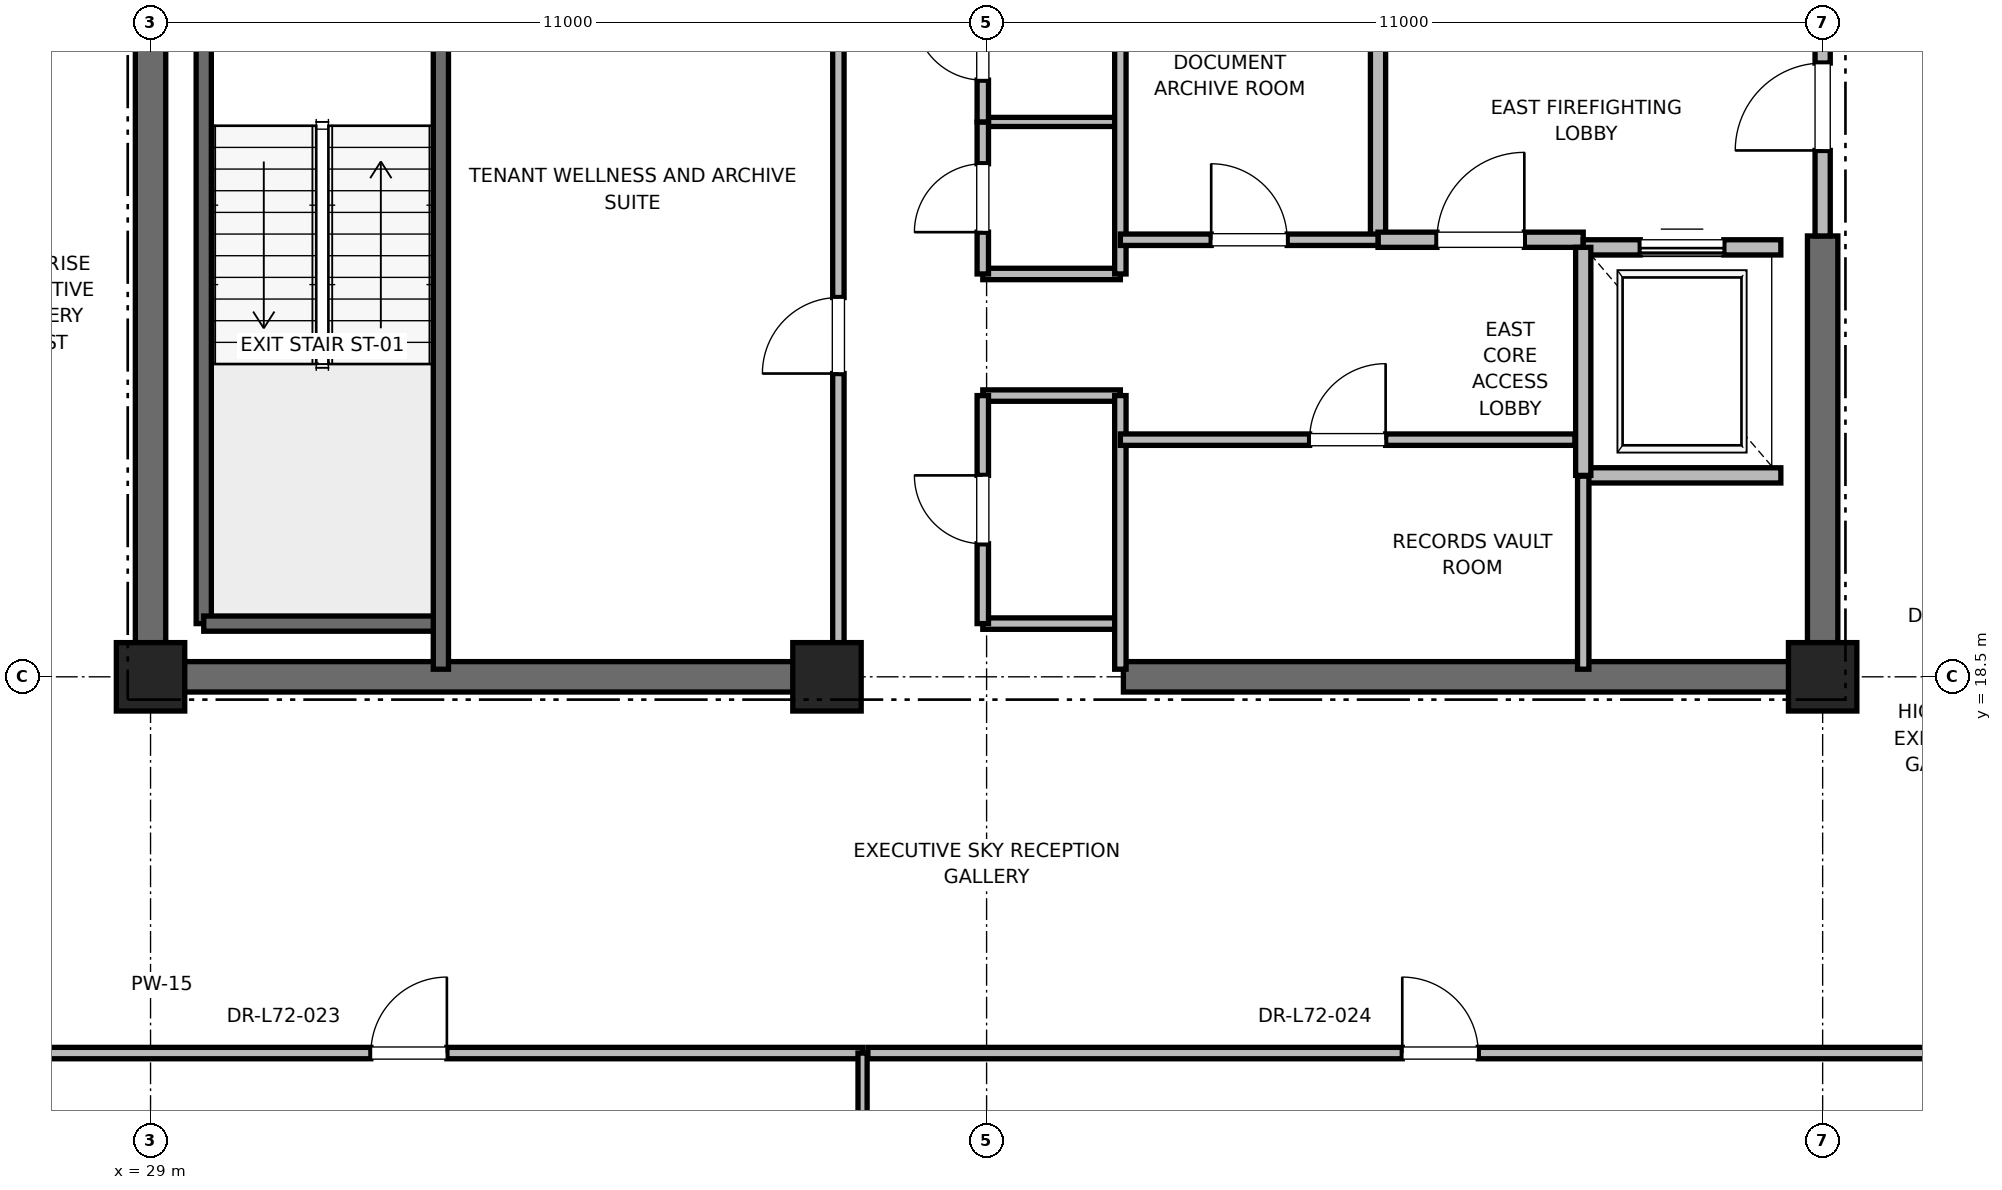
"""IFC4 building model, lengths in metres.
Left out: names, types, materials, properties, quantities, classifications, styles, units other than length and angle.
Written with IfcOpenShell. Run it as: python <this file> out.ifc"""

import sys

from ifc_helpers import new_model, si_unit, direction, frame, frame_2d, origin, origin_2d, place, context, subcontext, project, spatial, rectangle, extrude, element, fill, save


model = new_model("IFC4")
c1 = context("Model", 3, precision=1e-05, world=origin(), true_north=direction((0.0, 1.0)))
c2 = subcontext(c1, "Body", "Model", "MODEL_VIEW")
j1 = project(units=[si_unit("LENGTHUNIT", "METRE"), si_unit("PLANEANGLEUNIT", "RADIAN")], contexts=[c1])
p1 = place(None, origin())
s1 = spatial("IfcSite", under=j1, at=p1, CompositionType="ELEMENT")
p2 = place(p1, origin())
s2 = spatial("IfcBuilding", under=s1, at=p2, CompositionType="ELEMENT")
p3 = place(p2, frame((0.0, 0.0, 310.8)))
s3 = spatial("IfcBuildingStorey", under=s2, at=p3, CompositionType="ELEMENT", Elevation=310.8)
for number, where, z_axis, x_axis in (
    (1, (29.0, 18.5, 0.0), (0.0, 0.0, 1.0), (1.0, 0.0, 0.0)),
    (2, (51.0, 18.5, 0.0), (0.0, 0.0, 1.0), (1.0, 0.0, 0.0)),
    (3, (37.9, 18.5, 0.0), (0.0, 0.0, 1.0), (1.0, 0.0, 0.0)),
):
    element("IfcColumn", number, at=place(p3, frame(where, z_axis=z_axis, x_axis=x_axis)), inside=s3, PredefinedType="PILASTER", context=c2, shape_type="SweptSolid", body=[
        extrude(rectangle(XDim=0.9, YDim=0.9, at=origin_2d()), origin(), (0.0, 0.0, 1.0), 4.0),
    ])
for number, where, z_axis, x_axis in (
    (4, (29.0, 18.5, 0.0), (0.0, 0.0, 1.0), (1.0, 0.0, 0.0)),
    (5, (41.8, 18.5, 0.0), (0.0, 0.0, 1.0), (1.0, 0.0, 0.0)),
):
    element("IfcWall", number, at=place(p3, frame(where, z_axis=z_axis, x_axis=x_axis)), inside=s3, PredefinedType="SHEAR", context=c2, shape_type="SweptSolid", body=[
        extrude(rectangle(XDim=9.2, YDim=0.4, at=frame_2d((4.6, 0.0))), origin(), (0.0, 0.0, 1.0), 3.785),
    ])
p4 = place(p3, frame((29.0, 18.5, 0.0), z_axis=(0.0, 0.0, 1.0), x_axis=(0.0, 1.0, 0.0)))
e6 = element("IfcWall", 6, at=p4, inside=s3, PredefinedType="SHEAR", context=c2, shape_type="SweptSolid", body=[
    extrude(rectangle(XDim=8.8, YDim=0.4, at=frame_2d((4.4, 0.0))), origin(), (0.0, 0.0, 1.0), 3.785),
])
p5 = place(p3, frame((51.0, 18.5, 0.0), z_axis=(0.0, 0.0, 1.0), x_axis=(0.0, 1.0, 0.0)))
e7 = element("IfcWall", 7, at=p5, inside=s3, PredefinedType="SHEAR", context=c2, shape_type="SweptSolid", body=[
    extrude(rectangle(XDim=5.8, YDim=0.4, at=frame_2d((2.9, 0.0))), origin(), (0.0, 0.0, 1.0), 3.785),
])
p6 = place(p3, frame((29.7, 19.2, 0.0), z_axis=(0.0, 0.0, 1.0), x_axis=(0.0, 1.0, 0.0)))
e8 = element("IfcWall", 8, at=p6, inside=s3, PredefinedType="SOLIDWALL", context=c2, shape_type="SweptSolid", body=[
    extrude(rectangle(XDim=8.15, YDim=0.2, at=frame_2d((4.075, 0.0))), origin(), (0.0, 0.0, 1.0), 3.785),
])
p7 = place(p3, frame((29.7, 19.2, 0.0), z_axis=(0.0, 0.0, 1.0), x_axis=(1.0, 0.0, 0.0)))
e9 = element("IfcWall", 9, at=p7, inside=s3, PredefinedType="SOLIDWALL", context=c2, shape_type="SweptSolid", body=[
    extrude(rectangle(XDim=3.12, YDim=0.2, at=frame_2d((1.56, 0.0))), origin(), (0.0, 0.0, 1.0), 3.785),
])
p8 = place(p3, frame((32.82, 18.6, 0.0), z_axis=(0.0, 0.0, 1.0), x_axis=(0.0, 1.0, 0.0)))
e10 = element("IfcWall", 10, at=p8, inside=s3, PredefinedType="SOLIDWALL", context=c2, shape_type="SweptSolid", body=[
    extrude(rectangle(XDim=8.78, YDim=0.2, at=frame_2d((4.39, 0.0))), origin(), (0.0, 0.0, 1.0), 3.785),
])
p9 = place(p3, frame((45.15, 24.25, 0.0), z_axis=(0.0, 0.0, 1.0), x_axis=(0.0, 1.0, 0.0)))
e11 = element("IfcWall", 11, at=p9, inside=s3, PredefinedType="PARTITIONING", context=c2, shape_type="SweptSolid", body=[
    extrude(rectangle(XDim=3.37, YDim=0.2, at=frame_2d((1.685, 0.0))), origin(), (0.0, 0.0, 1.0), 3.785),
])
p10 = place(p3, frame((45.15, 24.25, 0.0), z_axis=(0.0, 0.0, 1.0), x_axis=(1.0, 0.0, 0.0)))
e12 = element("IfcWall", 12, at=p10, inside=s3, PredefinedType="PARTITIONING", context=c2, shape_type="SweptSolid", body=[
    extrude(rectangle(XDim=2.7, YDim=0.2, at=frame_2d((1.35, 0.0))), origin(), (0.0, 0.0, 1.0), 3.785),
])
p11 = place(p10, frame((0.775, 0.0, 0.0)))
e13 = element("IfcOpeningElement", 13, at=p11, cuts=e12, PredefinedType="OPENING", context=c2, shape_type="SweptSolid", body=[
    extrude(rectangle(XDim=1.15, YDim=2.2, at=frame_2d((0.575, 1.1))), frame((0.0, 0.1, 0.0), z_axis=(0.0, -1.0, 0.0), x_axis=(1.0, 0.0, 0.0)), (0.0, 0.0, 1.0), 0.2),
])
p12 = place(p3, frame((51.0, 24.3, 0.0), z_axis=(0.0, 0.0, 1.0), x_axis=(0.0, 1.0, 0.0)))
e14 = element("IfcWall", 14, at=p12, inside=s3, PredefinedType="PARTITIONING", context=c2, shape_type="SweptSolid", body=[
    extrude(rectangle(XDim=3.4, YDim=0.2, at=frame_2d((1.7, 0.0))), origin(), (0.0, 0.0, 1.0), 2.865),
])
p13 = place(p12, frame((1.125, 0.0, 0.0)))
e15 = element("IfcOpeningElement", 15, at=p13, cuts=e14, PredefinedType="OPENING", context=c2, shape_type="SweptSolid", body=[
    extrude(rectangle(XDim=1.15, YDim=2.2, at=frame_2d((0.575, 1.1))), frame((0.0, 0.1, 0.0), z_axis=(0.0, -1.0, 0.0), x_axis=(1.0, 0.0, 0.0)), (0.0, 0.0, 1.0), 0.2),
])
p14 = place(p3, frame((47.85, 21.15, 0.0), z_axis=(0.0, 0.0, 1.0), x_axis=(1.0, 0.0, 0.0)))
e16 = element("IfcWall", 16, at=p14, inside=s3, PredefinedType="SOLIDWALL", context=c2, shape_type="SweptSolid", body=[
    extrude(rectangle(XDim=2.6, YDim=0.2, at=frame_2d((1.3, 0.0))), origin(), (0.0, 0.0, 1.0), 3.785),
])
p15 = place(p3, frame((50.45, 24.15, 0.0), z_axis=(0.0, 0.0, 1.0), x_axis=(-1.0, 0.0, 0.0)))
e17 = element("IfcWall", 17, at=p15, inside=s3, PredefinedType="SOLIDWALL", context=c2, shape_type="SweptSolid", body=[
    extrude(rectangle(XDim=2.6, YDim=0.2, at=frame_2d((1.3, 0.0))), origin(), (0.0, 0.0, 1.0), 2.865),
])
p16 = place(p15, frame((0.75, 0.0, 0.0)))
e18 = element("IfcOpeningElement", 18, at=p16, cuts=e17, PredefinedType="OPENING", context=c2, shape_type="SweptSolid", body=[
    extrude(rectangle(XDim=1.1, YDim=2.2, at=frame_2d((0.55, 1.1))), frame((0.0, 0.1, 0.0), z_axis=(0.0, -1.0, 0.0), x_axis=(1.0, 0.0, 0.0)), (0.0, 0.0, 1.0), 0.2),
])
p17 = place(p3, frame((47.85, 24.15, 0.0), z_axis=(0.0, 0.0, 1.0), x_axis=(0.0, -1.0, 0.0)))
e19 = element("IfcWall", 19, at=p17, inside=s3, PredefinedType="SOLIDWALL", context=c2, shape_type="SweptSolid", body=[
    extrude(rectangle(XDim=3.0, YDim=0.2, at=frame_2d((1.5, 0.0))), origin(), (0.0, 0.0, 1.0), 3.785),
])
for number, where, z_axis, x_axis in (
    (20, (39.95, 19.2, 0.0), (0.0, 0.0, 1.0), (1.0, 0.0, 0.0)),
    (21, (39.95, 22.2, 0.0), (0.0, 0.0, 1.0), (1.0, 0.0, 0.0)),
    (22, (39.95, 23.8, 0.0), (0.0, 0.0, 1.0), (1.0, 0.0, 0.0)),
):
    element("IfcWall", number, at=place(p3, frame(where, z_axis=z_axis, x_axis=x_axis)), inside=s3, PredefinedType="PARTITIONING", context=c2, shape_type="SweptSolid", body=[
        extrude(rectangle(XDim=1.81, YDim=0.15, at=frame_2d((0.905, 0.0))), origin(), (0.0, 0.0, 1.0), 2.85),
    ])
p18 = place(p3, frame((39.95, 25.8, 0.0), z_axis=(0.0, 0.0, 1.0), x_axis=(1.0, 0.0, 0.0)))
e23 = element("IfcWall", 23, at=p18, inside=s3, PredefinedType="PARTITIONING", context=c2, shape_type="SweptSolid", body=[
    extrude(rectangle(XDim=1.81, YDim=0.12, at=frame_2d((0.905, 0.0))), origin(), (0.0, 0.0, 1.0), 2.85),
])
p19 = place(p3, frame((41.76, 18.6, 0.0), z_axis=(0.0, 0.0, 1.0), x_axis=(0.0, 1.0, 0.0)))
e24 = element("IfcWall", 24, at=p19, inside=s3, PredefinedType="PARTITIONING", context=c2, shape_type="SweptSolid", body=[
    extrude(rectangle(XDim=3.6, YDim=0.15, at=frame_2d((1.8, 0.0))), origin(), (0.0, 0.0, 1.0), 2.85),
])
p20 = place(p3, frame((41.76, 23.8, 0.0), z_axis=(0.0, 0.0, 1.0), x_axis=(0.0, 1.0, 0.0)))
e25 = element("IfcWall", 25, at=p20, inside=s3, PredefinedType="PARTITIONING", context=c2, shape_type="SweptSolid", body=[
    extrude(rectangle(XDim=4.0, YDim=0.15, at=frame_2d((2.0, 0.0))), origin(), (0.0, 0.0, 1.0), 2.85),
])
p21 = place(p3, frame((39.95, 19.2, 0.0), z_axis=(0.0, 0.0, 1.0), x_axis=(0.0, 1.0, 0.0)))
e26 = element("IfcWall", 26, at=p21, inside=s3, PredefinedType="PARTITIONING", context=c2, shape_type="SweptSolid", body=[
    extrude(rectangle(XDim=3.0, YDim=0.15, at=frame_2d((1.5, 0.0))), origin(), (0.0, 0.0, 1.0), 2.85),
])
p22 = place(p21, frame((1.05, 0.0, 0.0)))
e27 = element("IfcOpeningElement", 27, at=p22, cuts=e26, PredefinedType="OPENING", context=c2, shape_type="SweptSolid", body=[
    extrude(rectangle(XDim=0.9, YDim=2.1, at=frame_2d((0.45, 1.05))), frame((0.0, 0.075, 0.0), z_axis=(0.0, -1.0, 0.0), x_axis=(1.0, 0.0, 0.0)), (0.0, 0.0, 1.0), 0.15),
])
p23 = place(p3, frame((39.95, 23.8, 0.0), z_axis=(0.0, 0.0, 1.0), x_axis=(0.0, 1.0, 0.0)))
e28 = element("IfcWall", 28, at=p23, inside=s3, PredefinedType="PARTITIONING", context=c2, shape_type="SweptSolid", body=[
    extrude(rectangle(XDim=2.0, YDim=0.15, at=frame_2d((1.0, 0.0))), origin(), (0.0, 0.0, 1.0), 2.85),
])
p24 = place(p23, frame((0.55, 0.0, 0.0)))
e29 = element("IfcOpeningElement", 29, at=p24, cuts=e28, PredefinedType="OPENING", context=c2, shape_type="SweptSolid", body=[
    extrude(rectangle(XDim=0.9, YDim=2.1, at=frame_2d((0.45, 1.05))), frame((0.0, 0.075, 0.0), z_axis=(0.0, -1.0, 0.0), x_axis=(1.0, 0.0, 0.0)), (0.0, 0.0, 1.0), 0.15),
])
p25 = place(p3, frame((39.95, 25.8, 0.0), z_axis=(0.0, 0.0, 1.0), x_axis=(0.0, 1.0, 0.0)))
e30 = element("IfcWall", 30, at=p25, inside=s3, PredefinedType="PARTITIONING", context=c2, shape_type="SweptSolid", body=[
    extrude(rectangle(XDim=2.0, YDim=0.15, at=frame_2d((1.0, 0.0))), origin(), (0.0, 0.0, 1.0), 2.85),
])
p26 = place(p25, frame((0.55, 0.0, 0.0)))
e31 = element("IfcOpeningElement", 31, at=p26, cuts=e30, PredefinedType="OPENING", context=c2, shape_type="SweptSolid", body=[
    extrude(rectangle(XDim=0.9, YDim=2.1, at=frame_2d((0.45, 1.05))), frame((0.0, 0.075, 0.0), z_axis=(0.0, -1.0, 0.0), x_axis=(1.0, 0.0, 0.0)), (0.0, 0.0, 1.0), 0.15),
])
p27 = place(p3, frame((38.05, 18.6, 0.0), z_axis=(0.0, 0.0, 1.0), x_axis=(0.0, 1.0, 0.0)))
e32 = element("IfcWall", 32, at=p27, inside=s3, PredefinedType="PARTITIONING", context=c2, shape_type="SweptSolid", body=[
    extrude(rectangle(XDim=8.78, YDim=0.15, at=frame_2d((4.39, 0.0))), origin(), (0.0, 0.0, 1.0), 2.85),
])
p28 = place(p27, frame((3.89, 0.0, 0.0)))
e33 = element("IfcOpeningElement", 33, at=p28, cuts=e32, PredefinedType="OPENING", context=c2, shape_type="SweptSolid", body=[
    extrude(rectangle(XDim=1.0, YDim=2.15, at=frame_2d((0.5, 1.075))), frame((0.0, 0.075, 0.0), z_axis=(0.0, -1.0, 0.0), x_axis=(1.0, 0.0, 0.0)), (0.0, 0.0, 1.0), 0.15),
])
p29 = place(p3, frame((47.85, 18.6, 0.0), z_axis=(0.0, 0.0, 1.0), x_axis=(0.0, 1.0, 0.0)))
e34 = element("IfcWall", 34, at=p29, inside=s3, PredefinedType="PARTITIONING", context=c2, shape_type="SweptSolid", body=[
    extrude(rectangle(XDim=2.54, YDim=0.15, at=frame_2d((1.27, 0.0))), origin(), (0.0, 0.0, 1.0), 2.85),
])
p30 = place(p3, frame((41.76, 21.62, 0.0), z_axis=(0.0, 0.0, 1.0), x_axis=(1.0, 0.0, 0.0)))
e35 = element("IfcWall", 35, at=p30, inside=s3, PredefinedType="PARTITIONING", context=c2, shape_type="SweptSolid", body=[
    extrude(rectangle(XDim=5.98, YDim=0.15, at=frame_2d((2.99, 0.0))), origin(), (0.0, 0.0, 1.0), 2.85),
])
p31 = place(p30, frame((2.49, 0.0, 0.0)))
e36 = element("IfcOpeningElement", 36, at=p31, cuts=e35, PredefinedType="OPENING", context=c2, shape_type="SweptSolid", body=[
    extrude(rectangle(XDim=1.0, YDim=2.15, at=frame_2d((0.5, 1.075))), frame((0.0, 0.075, 0.0), z_axis=(0.0, -1.0, 0.0), x_axis=(1.0, 0.0, 0.0)), (0.0, 0.0, 1.0), 0.15),
])
p32 = place(p3, frame((41.76, 24.25, 0.0), z_axis=(0.0, 0.0, 1.0), x_axis=(1.0, 0.0, 0.0)))
e37 = element("IfcWall", 37, at=p32, inside=s3, PredefinedType="PARTITIONING", context=c2, shape_type="SweptSolid", body=[
    extrude(rectangle(XDim=3.39, YDim=0.15, at=frame_2d((1.695, 0.0))), origin(), (0.0, 0.0, 1.0), 2.85),
])
p33 = place(p32, frame((1.195, 0.0, 0.0)))
e38 = element("IfcOpeningElement", 38, at=p33, cuts=e37, PredefinedType="OPENING", context=c2, shape_type="SweptSolid", body=[
    extrude(rectangle(XDim=1.0, YDim=2.15, at=frame_2d((0.5, 1.075))), frame((0.0, 0.075, 0.0), z_axis=(0.0, -1.0, 0.0), x_axis=(1.0, 0.0, 0.0)), (0.0, 0.0, 1.0), 0.15),
])
p34 = place(p3, frame((26.4, 13.55, 0.0), z_axis=(0.0, 0.0, 1.0), x_axis=(1.0, 0.0, 0.0)))
e39 = element("IfcWall", 39, at=p34, inside=s3, PredefinedType="PARTITIONING", context=c2, shape_type="SweptSolid", body=[
    extrude(rectangle(XDim=11.968, YDim=0.15, at=frame_2d((5.984, 0.0))), origin(), (0.0, 0.0, 1.0), 2.85),
])
p35 = place(p34, frame((5.499, 0.0, 0.0)))
e40 = element("IfcOpeningElement", 40, at=p35, cuts=e39, PredefinedType="OPENING", context=c2, shape_type="SweptSolid", body=[
    extrude(rectangle(XDim=1.0, YDim=2.15, at=frame_2d((0.5, 1.075))), frame((0.0, 0.075, 0.0), z_axis=(0.0, -1.0, 0.0), x_axis=(1.0, 0.0, 0.0)), (0.0, 0.0, 1.0), 0.15),
])
p36 = place(p3, frame((38.368, 6.228, 0.0), z_axis=(0.0, 0.0, 1.0), x_axis=(0.0, 1.0, 0.0)))
e41 = element("IfcWall", 41, at=p36, inside=s3, PredefinedType="PARTITIONING", context=c2, shape_type="SweptSolid", body=[
    extrude(rectangle(XDim=7.322, YDim=0.12, at=frame_2d((3.661, 0.0))), origin(), (0.0, 0.0, 1.0), 2.415),
])
p37 = place(p3, frame((38.438, 13.55, 0.0), z_axis=(0.0, 0.0, 1.0), x_axis=(1.0, 0.0, 0.0)))
e42 = element("IfcWall", 42, at=p37, inside=s3, PredefinedType="PARTITIONING", context=c2, shape_type="SweptSolid", body=[
    extrude(rectangle(XDim=15.162, YDim=0.15, at=frame_2d((7.581, 0.0))), origin(), (0.0, 0.0, 1.0), 2.85),
])
p38 = place(p37, frame((7.031, 0.0, 0.0)))
e43 = element("IfcOpeningElement", 43, at=p38, cuts=e42, PredefinedType="OPENING", context=c2, shape_type="SweptSolid", body=[
    extrude(rectangle(XDim=1.0, YDim=2.15, at=frame_2d((0.5, 1.075))), frame((0.0, 0.075, 0.0), z_axis=(0.0, -1.0, 0.0), x_axis=(1.0, 0.0, 0.0)), (0.0, 0.0, 1.0), 0.15),
])
p39 = place(p11, origin())
e44 = element("IfcDoor", 44, at=p39, inside=s3, OperationType="SINGLE_SWING_RIGHT", PredefinedType="DOOR", context=c2, shape_type="SweptSolid", body=[
    extrude(rectangle(XDim=1.15, YDim=2.2, at=frame_2d((0.575, 1.1))), frame((0.0, 0.025, 0.0), z_axis=(0.0, -1.0, 0.0), x_axis=(1.0, 0.0, 0.0)), (0.0, 0.0, 1.0), 0.05),
])
fill(e13, e44)
p40 = place(p13, origin())
e45 = element("IfcDoor", 45, at=p40, inside=s3, OperationType="SINGLE_SWING_LEFT", PredefinedType="DOOR", context=c2, shape_type="SweptSolid", body=[
    extrude(rectangle(XDim=1.15, YDim=2.2, at=frame_2d((0.575, 1.1))), frame((0.0, 0.025, 0.0), z_axis=(0.0, -1.0, 0.0), x_axis=(1.0, 0.0, 0.0)), (0.0, 0.0, 1.0), 0.05),
])
fill(e15, e45)
p41 = place(p16, origin())
e46 = element("IfcDoor", 46, at=p41, inside=s3, OperationType="SLIDING_TO_RIGHT", PredefinedType="DOOR", context=c2, shape_type="SweptSolid", body=[
    extrude(rectangle(XDim=1.1, YDim=2.2, at=frame_2d((0.55, 1.1))), frame((0.0, 0.025, 0.0), z_axis=(0.0, -1.0, 0.0), x_axis=(1.0, 0.0, 0.0)), (0.0, 0.0, 1.0), 0.05),
])
fill(e18, e46)
p42 = place(p22, origin())
e47 = element("IfcDoor", 47, at=p42, inside=s3, OperationType="SINGLE_SWING_RIGHT", PredefinedType="DOOR", context=c2, shape_type="SweptSolid", body=[
    extrude(rectangle(XDim=0.9, YDim=2.1, at=frame_2d((0.45, 1.05))), frame((0.0, 0.025, 0.0), z_axis=(0.0, -1.0, 0.0), x_axis=(1.0, 0.0, 0.0)), (0.0, 0.0, 1.0), 0.05),
])
fill(e27, e47)
p43 = place(p24, origin())
e48 = element("IfcDoor", 48, at=p43, inside=s3, OperationType="SINGLE_SWING_LEFT", PredefinedType="DOOR", context=c2, shape_type="SweptSolid", body=[
    extrude(rectangle(XDim=0.9, YDim=2.1, at=frame_2d((0.45, 1.05))), frame((0.0, 0.025, 0.0), z_axis=(0.0, -1.0, 0.0), x_axis=(1.0, 0.0, 0.0)), (0.0, 0.0, 1.0), 0.05),
])
fill(e29, e48)
p44 = place(p26, origin())
e49 = element("IfcDoor", 49, at=p44, inside=s3, OperationType="SINGLE_SWING_RIGHT", PredefinedType="DOOR", context=c2, shape_type="SweptSolid", body=[
    extrude(rectangle(XDim=0.9, YDim=2.1, at=frame_2d((0.45, 1.05))), frame((0.0, 0.025, 0.0), z_axis=(0.0, -1.0, 0.0), x_axis=(1.0, 0.0, 0.0)), (0.0, 0.0, 1.0), 0.05),
])
fill(e31, e49)
p45 = place(p28, origin())
e50 = element("IfcDoor", 50, at=p45, inside=s3, OperationType="SINGLE_SWING_LEFT", PredefinedType="DOOR", context=c2, shape_type="SweptSolid", body=[
    extrude(rectangle(XDim=1.0, YDim=2.15, at=frame_2d((0.5, 1.075))), frame((0.0, 0.025, 0.0), z_axis=(0.0, -1.0, 0.0), x_axis=(1.0, 0.0, 0.0)), (0.0, 0.0, 1.0), 0.05),
])
fill(e33, e50)
p46 = place(p31, origin())
e51 = element("IfcDoor", 51, at=p46, inside=s3, OperationType="SINGLE_SWING_RIGHT", PredefinedType="DOOR", context=c2, shape_type="SweptSolid", body=[
    extrude(rectangle(XDim=1.0, YDim=2.15, at=frame_2d((0.5, 1.075))), frame((0.0, 0.025, 0.0), z_axis=(0.0, -1.0, 0.0), x_axis=(1.0, 0.0, 0.0)), (0.0, 0.0, 1.0), 0.05),
])
fill(e36, e51)
p47 = place(p33, origin())
e52 = element("IfcDoor", 52, at=p47, inside=s3, OperationType="SINGLE_SWING_LEFT", PredefinedType="DOOR", context=c2, shape_type="SweptSolid", body=[
    extrude(rectangle(XDim=1.0, YDim=2.15, at=frame_2d((0.5, 1.075))), frame((0.0, 0.025, 0.0), z_axis=(0.0, -1.0, 0.0), x_axis=(1.0, 0.0, 0.0)), (0.0, 0.0, 1.0), 0.05),
])
fill(e38, e52)
p48 = place(p35, origin())
e53 = element("IfcDoor", 53, at=p48, inside=s3, OperationType="SINGLE_SWING_RIGHT", PredefinedType="DOOR", context=c2, shape_type="SweptSolid", body=[
    extrude(rectangle(XDim=1.0, YDim=2.15, at=frame_2d((0.5, 1.075))), frame((0.0, 0.025, 0.0), z_axis=(0.0, -1.0, 0.0), x_axis=(1.0, 0.0, 0.0)), (0.0, 0.0, 1.0), 0.05),
])
fill(e40, e53)
p49 = place(p38, origin())
e54 = element("IfcDoor", 54, at=p49, inside=s3, OperationType="SINGLE_SWING_LEFT", PredefinedType="DOOR", context=c2, shape_type="SweptSolid", body=[
    extrude(rectangle(XDim=1.0, YDim=2.15, at=frame_2d((0.5, 1.075))), frame((0.0, 0.025, 0.0), z_axis=(0.0, -1.0, 0.0), x_axis=(1.0, 0.0, 0.0)), (0.0, 0.0, 1.0), 0.05),
])
fill(e43, e54)
save(model, sys.argv[1])
